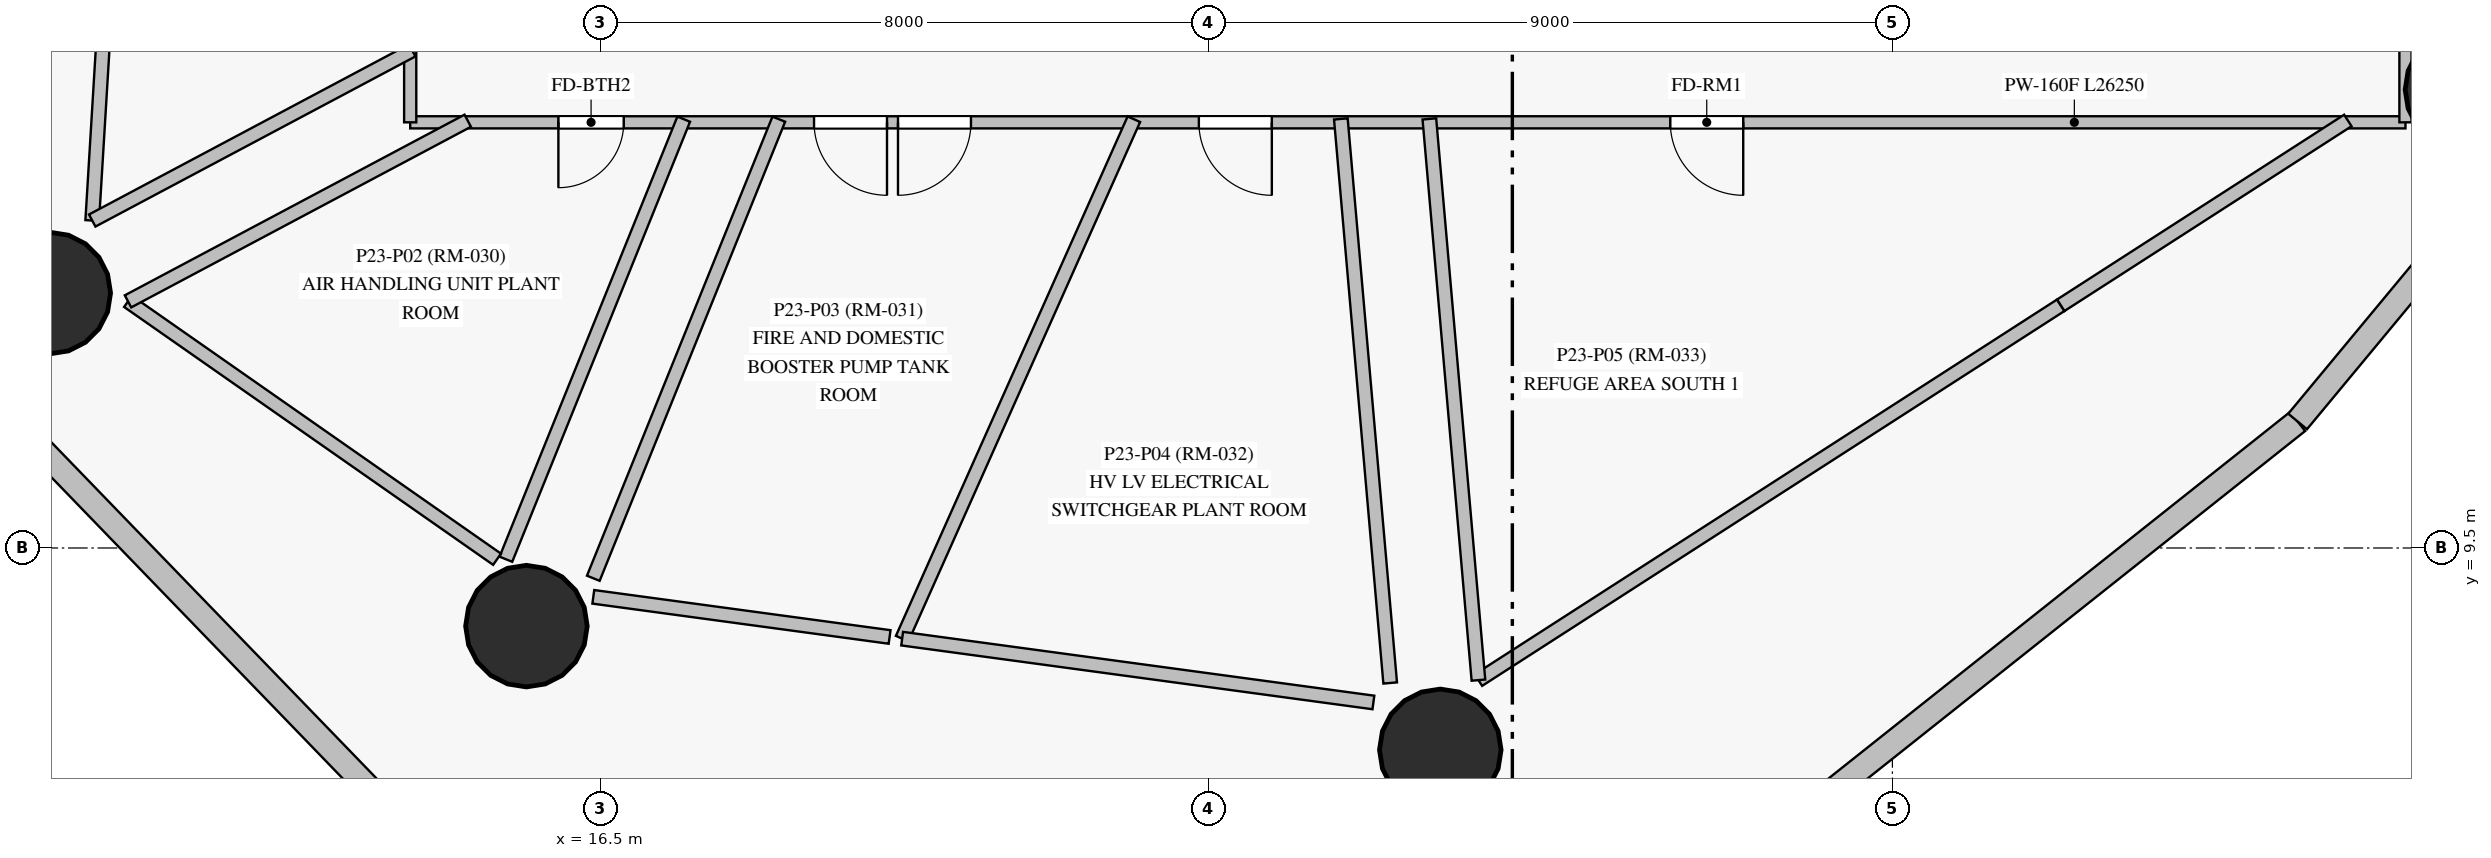
"""IFC4 building model, lengths in metres.
Left out: names, types, materials, properties, quantities, classifications, styles, units other than length and angle.
Written with IfcOpenShell. Run it as: python <this file> out.ifc"""

import sys

from ifc_helpers import new_model, si_unit, direction, frame, frame_2d, origin, origin_with_axes, origin_2d, place, context, subcontext, project, spatial, rectangle, circle, extrude, source, transform, mapped, element, fill, save


model = new_model("IFC4")
c1 = context("Model", 3, precision=1e-05, world=origin(), true_north=direction((0.0, 1.0)))
c2 = subcontext(c1, "Body", "Model", "MODEL_VIEW")
j1 = project(units=[si_unit("LENGTHUNIT", "METRE"), si_unit("PLANEANGLEUNIT", "RADIAN")], contexts=[c1])
p1 = place(None, origin())
s1 = spatial("IfcSite", under=j1, at=p1, CompositionType="ELEMENT")
p2 = place(p1, origin())
s2 = spatial("IfcBuilding", under=s1, at=p2, CompositionType="ELEMENT")
p3 = place(p2, frame((0.0, 0.0, 87.7)))
s3 = spatial("IfcBuildingStorey", under=s2, at=p3, CompositionType="ELEMENT", Elevation=87.7)
m1 = source(origin_with_axes(), c2, "Body", "SweptSolid", [
    extrude(circle(Radius=0.8, at=origin_2d()), origin(), (0.0, 0.0, 1.0), 4.5),
])
for number, where, z_axis, x_axis in (
    (1, (9.258, 12.854, 0.0), (0.0, 0.0, 1.0), (1.0, 0.0, 0.0)),
    (2, (15.529, 8.472, 0.0), (0.0, 0.0, 1.0), (1.0, 0.0, 0.0)),
    (3, (27.552, 6.844, 0.0), (0.0, 0.0, 1.0), (1.0, 0.0, 0.0)),
    (4, (41.046, 15.53, 0.0), (0.0, 0.0, 1.0), (1.0, 0.0, 0.0)),
):
    element("IfcColumn", number, at=place(p3, frame(where, z_axis=z_axis, x_axis=x_axis)), inside=s3, PredefinedType="COLUMN", context=c2, shape_type="MappedRepresentation", body=[
        mapped(m1, transform((0.0, 0.0, 0.0), scale=1.0)),
    ])
p4 = place(p3, frame((8.439, 11.529, 0.0), z_axis=(0.0, 0.0, 1.0), x_axis=(0.695234061652, -0.71878341628, 0.0)))
e5 = element("IfcWall", 5, at=p4, inside=s3, PredefinedType="SOLIDWALL", context=c2, shape_type="SweptSolid", body=[
    extrude(rectangle(XDim=12.482, YDim=0.32, at=frame_2d((6.241, 0.0))), origin(), (0.0, 0.0, 1.0), 4.275),
])
p5 = place(p3, frame((27.103, 1.85, 0.0), z_axis=(0.0, 0.0, 1.0), x_axis=(0.783104543347, 0.62189008208, 0.0)))
e6 = element("IfcWall", 6, at=p5, inside=s3, PredefinedType="SOLIDWALL", context=c2, shape_type="SweptSolid", body=[
    extrude(rectangle(XDim=14.977, YDim=0.32, at=frame_2d((7.489, 0.0))), origin(), (0.0, 0.0, 1.0), 4.275),
])
p6 = place(p3, frame((38.831, 11.164, 0.0), z_axis=(0.0, 0.0, 1.0), x_axis=(0.638490036226, 0.769630088835, 0.0)))
e7 = element("IfcWall", 7, at=p6, inside=s3, PredefinedType="SOLIDWALL", context=c2, shape_type="SweptSolid", body=[
    extrude(rectangle(XDim=10.412, YDim=0.32, at=frame_2d((5.206, 0.0))), origin(), (0.0, 0.0, 1.0), 4.275),
])
p7 = place(p3, frame((40.25, 15.1, 0.0), z_axis=(0.0, 0.0, 1.0), x_axis=(-1.0, 0.0, 0.0)))
e8 = element("IfcWall", 8, at=p7, inside=s3, PredefinedType="PARTITIONING", context=c2, shape_type="SweptSolid", body=[
    extrude(rectangle(XDim=26.25, YDim=0.16, at=frame_2d((13.125, 0.0))), origin(), (0.0, 0.0, 1.0), 2.775),
])
p8 = place(p7, frame((8.712, 0.0, 0.0)))
e9 = element("IfcOpeningElement", 9, at=p8, cuts=e8, PredefinedType="OPENING", context=c2, shape_type="SweptSolid", body=[
    extrude(rectangle(XDim=0.96, YDim=2.15, at=frame_2d((0.48, 1.075))), frame((0.0, 0.09, 0.0), z_axis=(0.0, -1.0, 0.0), x_axis=(1.0, 0.0, 0.0)), (0.0, 0.0, 1.0), 0.18),
])
p9 = place(p7, frame((19.977, 0.0, 0.0)))
e10 = element("IfcOpeningElement", 10, at=p9, cuts=e8, PredefinedType="OPENING", context=c2, shape_type="SweptSolid", body=[
    extrude(rectangle(XDim=0.96, YDim=2.15, at=frame_2d((0.48, 1.075))), frame((0.0, 0.09, 0.0), z_axis=(0.0, -1.0, 0.0), x_axis=(1.0, 0.0, 0.0)), (0.0, 0.0, 1.0), 0.18),
])
p10 = place(p7, frame((18.873, 0.0, 0.0)))
e11 = element("IfcOpeningElement", 11, at=p10, cuts=e8, PredefinedType="OPENING", context=c2, shape_type="SweptSolid", body=[
    extrude(rectangle(XDim=0.96, YDim=2.15, at=frame_2d((0.48, 1.075))), frame((0.0, 0.09, 0.0), z_axis=(0.0, -1.0, 0.0), x_axis=(1.0, 0.0, 0.0)), (0.0, 0.0, 1.0), 0.18),
])
p11 = place(p7, frame((14.914, 0.0, 0.0)))
e12 = element("IfcOpeningElement", 12, at=p11, cuts=e8, PredefinedType="OPENING", context=c2, shape_type="SweptSolid", body=[
    extrude(rectangle(XDim=0.96, YDim=2.15, at=frame_2d((0.48, 1.075))), frame((0.0, 0.09, 0.0), z_axis=(0.0, -1.0, 0.0), x_axis=(1.0, 0.0, 0.0)), (0.0, 0.0, 1.0), 0.18),
])
p12 = place(p7, frame((23.44, 0.0, 0.0)))
e13 = element("IfcOpeningElement", 13, at=p12, cuts=e8, PredefinedType="OPENING", context=c2, shape_type="SweptSolid", body=[
    extrude(rectangle(XDim=0.86, YDim=2.04, at=frame_2d((0.43, 1.02))), frame((0.0, 0.09, 0.0), z_axis=(0.0, -1.0, 0.0), x_axis=(1.0, 0.0, 0.0)), (0.0, 0.0, 1.0), 0.18),
])
p13 = place(p3, frame((40.25, 38.1, 0.0), z_axis=(0.0, 0.0, 1.0), x_axis=(0.0, -1.0, 0.0)))
e14 = element("IfcWall", 14, at=p13, inside=s3, PredefinedType="PARTITIONING", context=c2, shape_type="SweptSolid", body=[
    extrude(rectangle(XDim=23.0, YDim=0.16, at=frame_2d((11.5, 0.0))), origin(), (0.0, 0.0, 1.0), 2.875),
])
p14 = place(p13, frame((11.025, 0.0, 0.0)))
e15 = element("IfcOpeningElement", 15, at=p14, cuts=e14, PredefinedType="OPENING", context=c2, shape_type="SweptSolid", body=[
    extrude(rectangle(XDim=0.96, YDim=2.15, at=frame_2d((0.48, 1.075))), frame((0.0, 0.09, 0.0), z_axis=(0.0, -1.0, 0.0), x_axis=(1.0, 0.0, 0.0)), (0.0, 0.0, 1.0), 0.18),
])
p15 = place(p13, frame((7.575, 0.0, 0.0)))
e16 = element("IfcOpeningElement", 16, at=p15, cuts=e14, PredefinedType="OPENING", context=c2, shape_type="SweptSolid", body=[
    extrude(rectangle(XDim=0.96, YDim=2.15, at=frame_2d((0.48, 1.075))), frame((0.0, 0.09, 0.0), z_axis=(0.0, -1.0, 0.0), x_axis=(1.0, 0.0, 0.0)), (0.0, 0.0, 1.0), 0.18),
])
p16 = place(p13, frame((5.235, 0.0, 0.0)))
e17 = element("IfcOpeningElement", 17, at=p16, cuts=e14, PredefinedType="OPENING", context=c2, shape_type="SweptSolid", body=[
    extrude(rectangle(XDim=0.96, YDim=2.15, at=frame_2d((0.48, 1.075))), frame((0.0, 0.09, 0.0), z_axis=(0.0, -1.0, 0.0), x_axis=(1.0, 0.0, 0.0)), (0.0, 0.0, 1.0), 0.18),
])
p17 = place(p3, frame((35.715, 12.693, 0.0), z_axis=(0.0, 0.0, 1.0), x_axis=(-0.840859678973, -0.541253175767, 0.0)))
e18 = element("IfcWall", 18, at=p17, inside=s3, PredefinedType="PARTITIONING", context=c2, shape_type="SweptSolid", body=[
    extrude(rectangle(XDim=9.111, YDim=0.18, at=frame_2d((4.556, 0.0))), origin(), (0.0, 0.0, 1.0), 3.375),
])
p18 = place(p3, frame((9.817, 13.808, 0.0), z_axis=(0.0, 0.0, 1.0), x_axis=(0.060568138709, 0.998164064958, 0.0)))
e19 = element("IfcWall", 19, at=p18, inside=s3, PredefinedType="PARTITIONING", context=c2, shape_type="SweptSolid", body=[
    extrude(rectangle(XDim=8.573, YDim=0.18, at=frame_2d((4.287, 0.0))), origin(), (0.0, 0.0, 1.0), 3.375),
])
p19 = place(p3, frame((20.472, 8.307, 0.0), z_axis=(0.0, 0.0, 1.0), x_axis=(0.407367120146, 0.913264490399, 0.0)))
e20 = element("IfcWall", 20, at=p19, inside=s3, PredefinedType="PARTITIONING", context=c2, shape_type="SweptSolid", body=[
    extrude(rectangle(XDim=7.483, YDim=0.18, at=frame_2d((3.741, 0.0))), origin(), (0.0, 0.0, 1.0), 4.275),
])
p20 = place(p3, frame((26.244, 15.145, 0.0), z_axis=(0.0, 0.0, 1.0), x_axis=(0.087116128231, -0.996198163119, 0.0)))
e21 = element("IfcWall", 21, at=p20, inside=s3, PredefinedType="PARTITIONING", context=c2, shape_type="SweptSolid", body=[
    extrude(rectangle(XDim=7.449, YDim=0.18, at=frame_2d((3.725, 0.0))), origin(), (0.0, 0.0, 1.0), 2.775),
])
p21 = place(p3, frame((28.054, 7.762, 0.0), z_axis=(0.0, 0.0, 1.0), x_axis=(-0.087131398075, 0.996196827675, 0.0)))
e22 = element("IfcWall", 22, at=p21, inside=s3, PredefinedType="PARTITIONING", context=c2, shape_type="SweptSolid", body=[
    extrude(rectangle(XDim=7.411, YDim=0.18, at=frame_2d((3.706, 0.0))), origin(), (0.0, 0.0, 1.0), 2.775),
])
p22 = place(p3, frame((14.0, 15.1, 0.0), z_axis=(0.0, 0.0, 1.0), x_axis=(0.0, 1.0, 0.0)))
e23 = element("IfcWall", 23, at=p22, inside=s3, PredefinedType="PARTITIONING", context=c2, shape_type="SweptSolid", body=[
    extrude(rectangle(XDim=7.045, YDim=0.16, at=frame_2d((3.522, 0.0))), origin(), (0.0, 0.0, 1.0), 4.275),
])
p23 = place(p22, frame((2.865, 0.0, 0.0)))
e24 = element("IfcOpeningElement", 24, at=p23, cuts=e23, PredefinedType="OPENING", context=c2, shape_type="SweptSolid", body=[
    extrude(rectangle(XDim=0.96, YDim=2.15, at=frame_2d((0.48, 1.075))), frame((0.0, 0.09, 0.0), z_axis=(0.0, -1.0, 0.0), x_axis=(1.0, 0.0, 0.0)), (0.0, 0.0, 1.0), 0.18),
])
p24 = place(p3, frame((16.409, 9.102, 0.0), z_axis=(0.0, 0.0, 1.0), x_axis=(0.374632213705, 0.927173502886, 0.0)))
e25 = element("IfcWall", 25, at=p24, inside=s3, PredefinedType="PARTITIONING", context=c2, shape_type="SweptSolid", body=[
    extrude(rectangle(XDim=6.514, YDim=0.18, at=frame_2d((3.257, 0.0))), origin(), (0.0, 0.0, 1.0), 2.775),
])
p25 = place(p3, frame((26.672, 7.468, 0.0), z_axis=(0.0, 0.0, 1.0), x_axis=(-0.990959367571, 0.134162333847, 0.0)))
e26 = element("IfcWall", 26, at=p25, inside=s3, PredefinedType="PARTITIONING", context=c2, shape_type="SweptSolid", body=[
    extrude(rectangle(XDim=6.256, YDim=0.18, at=frame_2d((3.128, 0.0))), origin(), (0.0, 0.0, 1.0), 2.875),
])
p26 = place(p3, frame((17.598, 15.142, 0.0), z_axis=(0.0, 0.0, 1.0), x_axis=(-0.374637585646, -0.927171332291, 0.0)))
e27 = element("IfcWall", 27, at=p26, inside=s3, PredefinedType="PARTITIONING", context=c2, shape_type="SweptSolid", body=[
    extrude(rectangle(XDim=6.244, YDim=0.18, at=frame_2d((3.122, 0.0))), origin(), (0.0, 0.0, 1.0), 2.775),
])
p27 = place(p3, frame((15.143, 9.352, 0.0), z_axis=(0.0, 0.0, 1.0), x_axis=(-0.819700282041, 0.572792674205, 0.0)))
e28 = element("IfcWall", 28, at=p27, inside=s3, PredefinedType="PARTITIONING", context=c2, shape_type="SweptSolid", body=[
    extrude(rectangle(XDim=5.923, YDim=0.18, at=frame_2d((2.961, 0.0))), origin(), (0.0, 0.0, 1.0), 2.875),
])
p28 = place(p3, frame((10.288, 12.745, 0.0), z_axis=(0.0, 0.0, 1.0), x_axis=(0.882947684132, 0.469471391126, 0.0)))
e29 = element("IfcWall", 29, at=p28, inside=s3, PredefinedType="PARTITIONING", context=c2, shape_type="SweptSolid", body=[
    extrude(rectangle(XDim=5.062, YDim=0.18, at=frame_2d((2.531, 0.0))), origin(), (0.0, 0.0, 1.0), 2.775),
])
p29 = place(p3, frame((14.027, 16.046, 0.0), z_axis=(0.0, 0.0, 1.0), x_axis=(-0.882953233195, -0.469460954702, 0.0)))
e30 = element("IfcWall", 30, at=p29, inside=s3, PredefinedType="PARTITIONING", context=c2, shape_type="SweptSolid", body=[
    extrude(rectangle(XDim=4.768, YDim=0.18, at=frame_2d((2.384, 0.0))), origin(), (0.0, 0.0, 1.0), 2.775),
])
p30 = place(p3, frame((39.492, 15.124, 0.0), z_axis=(0.0, 0.0, 1.0), x_axis=(-0.840856911957, -0.541257474419, 0.0)))
e31 = element("IfcWall", 31, at=p30, inside=s3, PredefinedType="PARTITIONING", context=c2, shape_type="SweptSolid", body=[
    extrude(rectangle(XDim=4.492, YDim=0.18, at=frame_2d((2.246, 0.0))), origin(), (0.0, 0.0, 1.0), 3.375),
])
p31 = place(p3, frame((20.307, 8.33, 0.0), z_axis=(0.0, 0.0, 1.0), x_axis=(-0.990955883797, 0.134188063433, 0.0)))
e32 = element("IfcWall", 32, at=p31, inside=s3, PredefinedType="PARTITIONING", context=c2, shape_type="SweptSolid", body=[
    extrude(rectangle(XDim=3.934, YDim=0.18, at=frame_2d((1.967, 0.0))), origin(), (0.0, 0.0, 1.0), 2.875),
])
m2 = source(origin_with_axes(), c2, "Body", "SweptSolid", [
    extrude(rectangle(XDim=0.96, YDim=2.15, at=frame_2d((0.48, 1.075))), frame((0.0, 0.025, 0.0), z_axis=(0.0, -1.0, 0.0), x_axis=(1.0, 0.0, 0.0)), (0.0, 0.0, 1.0), 0.05),
])
p32 = place(p8, origin())
e33 = element("IfcDoor", 33, at=p32, inside=s3, OperationType="SINGLE_SWING_LEFT", PredefinedType="DOOR", context=c2, shape_type="MappedRepresentation", body=[
    mapped(m2, transform((0.0, 0.0, 0.0), scale=1.0)),
])
fill(e9, e33)
p33 = place(p9, origin())
e34 = element("IfcDoor", 34, at=p33, inside=s3, OperationType="SINGLE_SWING_LEFT", PredefinedType="DOOR", context=c2, shape_type="MappedRepresentation", body=[
    mapped(m2, transform((0.0, 0.0, 0.0), scale=1.0)),
])
fill(e10, e34)
p34 = place(p10, origin())
e35 = element("IfcDoor", 35, at=p34, inside=s3, OperationType="SINGLE_SWING_RIGHT", PredefinedType="DOOR", context=c2, shape_type="MappedRepresentation", body=[
    mapped(m2, transform((0.0, 0.0, 0.0), scale=1.0)),
])
fill(e11, e35)
p35 = place(p11, origin())
e36 = element("IfcDoor", 36, at=p35, inside=s3, OperationType="SINGLE_SWING_LEFT", PredefinedType="DOOR", context=c2, shape_type="MappedRepresentation", body=[
    mapped(m2, transform((0.0, 0.0, 0.0), scale=1.0)),
])
fill(e12, e36)
m3 = source(origin_with_axes(), c2, "Body", "SweptSolid", [
    extrude(rectangle(XDim=0.86, YDim=2.04, at=frame_2d((0.43, 1.02))), frame((0.0, 0.025, 0.0), z_axis=(0.0, -1.0, 0.0), x_axis=(1.0, 0.0, 0.0)), (0.0, 0.0, 1.0), 0.05),
])
p36 = place(p12, origin())
e37 = element("IfcDoor", 37, at=p36, inside=s3, OperationType="SINGLE_SWING_RIGHT", PredefinedType="DOOR", context=c2, shape_type="MappedRepresentation", body=[
    mapped(m3, transform((0.0, 0.0, 0.0), scale=1.0)),
])
fill(e13, e37)
save(model, sys.argv[1])
